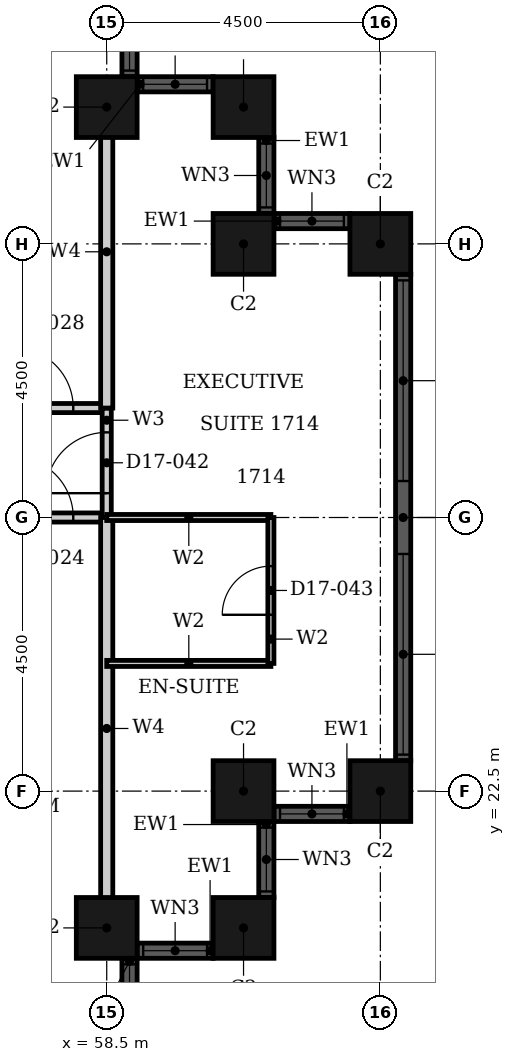
"""IFC4 building model, lengths in metres.
Left out: names, types, materials, properties, quantities, classifications, styles, units other than length and angle.
Written with IfcOpenShell. Run it as: python <this file> out.ifc"""

import sys

from ifc_helpers import new_model, si_unit, direction, frame, frame_2d, origin, origin_2d, place, context, subcontext, project, spatial, rectangle, hollow_rectangle, extrude, element, fill, save


model = new_model("IFC4")
c1 = context("Model", 3, precision=1e-05, world=origin(), true_north=direction((0.0, 1.0)))
c2 = subcontext(c1, "Body", "Model", "MODEL_VIEW")
j1 = project(units=[si_unit("LENGTHUNIT", "METRE"), si_unit("PLANEANGLEUNIT", "RADIAN")], contexts=[c1])
p1 = place(None, origin())
s1 = spatial("IfcSite", under=j1, at=p1, CompositionType="ELEMENT")
p2 = place(p1, origin())
s2 = spatial("IfcBuilding", under=s1, at=p2, CompositionType="ELEMENT")
p3 = place(p2, frame((0.0, 0.0, 74.4)))
s3 = spatial("IfcBuildingStorey", under=s2, at=p3, CompositionType="ELEMENT", Elevation=74.4)
for number, where, z_axis, x_axis in (
    (1, (58.5, 20.25, 0.0), (0.0, 0.0, 1.0), (1.0, 0.0, 0.0)),
    (2, (60.75, 20.25, 0.0), (0.0, 0.0, 1.0), (1.0, 0.0, 0.0)),
    (3, (60.75, 22.5, 0.0), (0.0, 0.0, 1.0), (1.0, 0.0, 0.0)),
    (4, (63.0, 22.5, 0.0), (0.0, 0.0, 1.0), (1.0, 0.0, 0.0)),
    (5, (63.0, 31.5, 0.0), (0.0, 0.0, 1.0), (1.0, 0.0, 0.0)),
    (6, (60.75, 31.5, 0.0), (0.0, 0.0, 1.0), (1.0, 0.0, 0.0)),
    (7, (60.75, 33.75, 0.0), (0.0, 0.0, 1.0), (1.0, 0.0, 0.0)),
    (8, (58.5, 33.75, 0.0), (0.0, 0.0, 1.0), (1.0, 0.0, 0.0)),
):
    element("IfcColumn", number, at=place(p3, frame(where, z_axis=z_axis, x_axis=x_axis)), inside=s3, PredefinedType="COLUMN", context=c2, shape_type="SweptSolid", body=[
        extrude(hollow_rectangle(XDim=1.0, YDim=1.0, WallThickness=0.032, at=origin_2d()), origin(), (0.0, 0.0, 1.0), 3.6),
    ])
p4 = place(p3, frame((58.875, 18.5, 0.0), z_axis=(0.0, 0.0, 1.0), x_axis=(0.0, 1.0, 0.0)))
e9 = element("IfcWall", 9, at=p4, inside=s3, PredefinedType="SOLIDWALL", context=c2, shape_type="SweptSolid", body=[
    extrude(rectangle(XDim=1.25, YDim=0.25, at=frame_2d((0.625, 0.0))), origin(), (0.0, 0.0, 1.0), 3.6),
])
p5 = place(p4, frame((0.1, 0.0, 0.9)))
e10 = element("IfcOpeningElement", 10, at=p5, cuts=e9, PredefinedType="OPENING", context=c2, shape_type="SweptSolid", body=[
    extrude(rectangle(XDim=1.05, YDim=2.08, at=frame_2d((0.525, 1.04))), frame((0.0, 0.135, 0.0), z_axis=(0.0, -1.0, 0.0), x_axis=(1.0, 0.0, 0.0)), (0.0, 0.0, 1.0), 0.27),
])
p6 = place(p3, frame((59.0, 19.875, 0.0), z_axis=(0.0, 0.0, 1.0), x_axis=(1.0, 0.0, 0.0)))
e11 = element("IfcWall", 11, at=p6, inside=s3, PredefinedType="SOLIDWALL", context=c2, shape_type="SweptSolid", body=[
    extrude(rectangle(XDim=1.25, YDim=0.25, at=frame_2d((0.625, 0.0))), origin(), (0.0, 0.0, 1.0), 3.6),
])
p7 = place(p6, frame((0.1, 0.0, 0.9)))
e12 = element("IfcOpeningElement", 12, at=p7, cuts=e11, PredefinedType="OPENING", context=c2, shape_type="SweptSolid", body=[
    extrude(rectangle(XDim=1.05, YDim=2.08, at=frame_2d((0.525, 1.04))), frame((0.0, 0.135, 0.0), z_axis=(0.0, -1.0, 0.0), x_axis=(1.0, 0.0, 0.0)), (0.0, 0.0, 1.0), 0.27),
])
p8 = place(p3, frame((61.125, 20.75, 0.0), z_axis=(0.0, 0.0, 1.0), x_axis=(0.0, 1.0, 0.0)))
e13 = element("IfcWall", 13, at=p8, inside=s3, PredefinedType="SOLIDWALL", context=c2, shape_type="SweptSolid", body=[
    extrude(rectangle(XDim=1.25, YDim=0.25, at=frame_2d((0.625, 0.0))), origin(), (0.0, 0.0, 1.0), 3.6),
])
p9 = place(p8, frame((0.1, 0.0, 0.9)))
e14 = element("IfcOpeningElement", 14, at=p9, cuts=e13, PredefinedType="OPENING", context=c2, shape_type="SweptSolid", body=[
    extrude(rectangle(XDim=1.05, YDim=2.08, at=frame_2d((0.525, 1.04))), frame((0.0, 0.135, 0.0), z_axis=(0.0, -1.0, 0.0), x_axis=(1.0, 0.0, 0.0)), (0.0, 0.0, 1.0), 0.27),
])
p10 = place(p3, frame((61.25, 22.125, 0.0), z_axis=(0.0, 0.0, 1.0), x_axis=(1.0, 0.0, 0.0)))
e15 = element("IfcWall", 15, at=p10, inside=s3, PredefinedType="SOLIDWALL", context=c2, shape_type="SweptSolid", body=[
    extrude(rectangle(XDim=1.25, YDim=0.25, at=frame_2d((0.625, 0.0))), origin(), (0.0, 0.0, 1.0), 3.6),
])
p11 = place(p10, frame((0.1, 0.0, 0.9)))
e16 = element("IfcOpeningElement", 16, at=p11, cuts=e15, PredefinedType="OPENING", context=c2, shape_type="SweptSolid", body=[
    extrude(rectangle(XDim=1.05, YDim=2.08, at=frame_2d((0.525, 1.04))), frame((0.0, 0.135, 0.0), z_axis=(0.0, -1.0, 0.0), x_axis=(1.0, 0.0, 0.0)), (0.0, 0.0, 1.0), 0.27),
])
p12 = place(p3, frame((63.375, 23.0, 0.0), z_axis=(0.0, 0.0, 1.0), x_axis=(0.0, 1.0, 0.0)))
e17 = element("IfcWall", 17, at=p12, inside=s3, PredefinedType="SOLIDWALL", context=c2, shape_type="SweptSolid", body=[
    extrude(rectangle(XDim=8.0, YDim=0.25, at=frame_2d((4.0, 0.0))), origin(), (0.0, 0.0, 1.0), 3.6),
])
p13 = place(p12, frame((0.1, 0.0, 0.9)))
e18 = element("IfcOpeningElement", 18, at=p13, cuts=e17, PredefinedType="OPENING", context=c2, shape_type="SweptSolid", body=[
    extrude(rectangle(XDim=3.3, YDim=2.08, at=frame_2d((1.65, 1.04))), frame((0.0, 0.135, 0.0), z_axis=(0.0, -1.0, 0.0), x_axis=(1.0, 0.0, 0.0)), (0.0, 0.0, 1.0), 0.27),
])
p14 = place(p12, frame((4.6, 0.0, 0.9)))
e19 = element("IfcOpeningElement", 19, at=p14, cuts=e17, PredefinedType="OPENING", context=c2, shape_type="SweptSolid", body=[
    extrude(rectangle(XDim=3.3, YDim=2.08, at=frame_2d((1.65, 1.04))), frame((0.0, 0.135, 0.0), z_axis=(0.0, -1.0, 0.0), x_axis=(1.0, 0.0, 0.0)), (0.0, 0.0, 1.0), 0.27),
])
p15 = place(p3, frame((62.5, 31.875, 0.0), z_axis=(0.0, 0.0, 1.0), x_axis=(-1.0, 0.0, 0.0)))
e20 = element("IfcWall", 20, at=p15, inside=s3, PredefinedType="SOLIDWALL", context=c2, shape_type="SweptSolid", body=[
    extrude(rectangle(XDim=1.25, YDim=0.25, at=frame_2d((0.625, 0.0))), origin(), (0.0, 0.0, 1.0), 3.6),
])
p16 = place(p15, frame((0.1, 0.0, 0.9)))
e21 = element("IfcOpeningElement", 21, at=p16, cuts=e20, PredefinedType="OPENING", context=c2, shape_type="SweptSolid", body=[
    extrude(rectangle(XDim=1.05, YDim=2.08, at=frame_2d((0.525, 1.04))), frame((0.0, 0.135, 0.0), z_axis=(0.0, -1.0, 0.0), x_axis=(1.0, 0.0, 0.0)), (0.0, 0.0, 1.0), 0.27),
])
p17 = place(p3, frame((61.125, 32.0, 0.0), z_axis=(0.0, 0.0, 1.0), x_axis=(0.0, 1.0, 0.0)))
e22 = element("IfcWall", 22, at=p17, inside=s3, PredefinedType="SOLIDWALL", context=c2, shape_type="SweptSolid", body=[
    extrude(rectangle(XDim=1.25, YDim=0.25, at=frame_2d((0.625, 0.0))), origin(), (0.0, 0.0, 1.0), 3.6),
])
p18 = place(p17, frame((0.1, 0.0, 0.9)))
e23 = element("IfcOpeningElement", 23, at=p18, cuts=e22, PredefinedType="OPENING", context=c2, shape_type="SweptSolid", body=[
    extrude(rectangle(XDim=1.05, YDim=2.08, at=frame_2d((0.525, 1.04))), frame((0.0, 0.135, 0.0), z_axis=(0.0, -1.0, 0.0), x_axis=(1.0, 0.0, 0.0)), (0.0, 0.0, 1.0), 0.27),
])
p19 = place(p3, frame((60.25, 34.125, 0.0), z_axis=(0.0, 0.0, 1.0), x_axis=(-1.0, 0.0, 0.0)))
e24 = element("IfcWall", 24, at=p19, inside=s3, PredefinedType="SOLIDWALL", context=c2, shape_type="SweptSolid", body=[
    extrude(rectangle(XDim=1.25, YDim=0.25, at=frame_2d((0.625, 0.0))), origin(), (0.0, 0.0, 1.0), 3.6),
])
p20 = place(p19, frame((0.1, 0.0, 0.9)))
e25 = element("IfcOpeningElement", 25, at=p20, cuts=e24, PredefinedType="OPENING", context=c2, shape_type="SweptSolid", body=[
    extrude(rectangle(XDim=1.05, YDim=2.08, at=frame_2d((0.525, 1.04))), frame((0.0, 0.135, 0.0), z_axis=(0.0, -1.0, 0.0), x_axis=(1.0, 0.0, 0.0)), (0.0, 0.0, 1.0), 0.27),
])
p21 = place(p3, frame((58.875, 34.25, 0.0), z_axis=(0.0, 0.0, 1.0), x_axis=(0.0, 1.0, 0.0)))
e26 = element("IfcWall", 26, at=p21, inside=s3, PredefinedType="SOLIDWALL", context=c2, shape_type="SweptSolid", body=[
    extrude(rectangle(XDim=1.25, YDim=0.25, at=frame_2d((0.625, 0.0))), origin(), (0.0, 0.0, 1.0), 3.6),
])
p22 = place(p21, frame((0.1, 0.0, 0.9)))
e27 = element("IfcOpeningElement", 27, at=p22, cuts=e26, PredefinedType="OPENING", context=c2, shape_type="SweptSolid", body=[
    extrude(rectangle(XDim=1.05, YDim=2.08, at=frame_2d((0.525, 1.04))), frame((0.0, 0.135, 0.0), z_axis=(0.0, -1.0, 0.0), x_axis=(1.0, 0.0, 0.0)), (0.0, 0.0, 1.0), 0.27),
])
p23 = place(p3, frame((46.8, 27.0, 0.0), z_axis=(0.0, 0.0, 1.0), x_axis=(1.0, 0.0, 0.0)))
e28 = element("IfcWall", 28, at=p23, inside=s3, PredefinedType="PARTITIONING", context=c2, shape_type="SweptSolid", body=[
    extrude(rectangle(XDim=11.7, YDim=0.15, at=frame_2d((5.85, 0.0))), origin(), (0.0, 0.0, 1.0), 2.58),
])
p24 = place(p23, frame((5.65, 0.0, 0.0)))
e29 = element("IfcOpeningElement", 29, at=p24, cuts=e28, PredefinedType="OPENING", context=c2, shape_type="SweptSolid", body=[
    extrude(rectangle(XDim=1.0, YDim=2.1, at=frame_2d((0.5, 1.05))), frame((0.0, 0.085, 0.0), z_axis=(0.0, -1.0, 0.0), x_axis=(1.0, 0.0, 0.0)), (0.0, 0.0, 1.0), 0.17),
])
p25 = place(p23, frame((10.15, 0.0, 0.0)))
e30 = element("IfcOpeningElement", 30, at=p25, cuts=e28, PredefinedType="OPENING", context=c2, shape_type="SweptSolid", body=[
    extrude(rectangle(XDim=1.0, YDim=2.1, at=frame_2d((0.5, 1.05))), frame((0.0, 0.085, 0.0), z_axis=(0.0, -1.0, 0.0), x_axis=(1.0, 0.0, 0.0)), (0.0, 0.0, 1.0), 0.17),
])
p26 = place(p3, frame((46.8, 28.8, 0.0), z_axis=(0.0, 0.0, 1.0), x_axis=(1.0, 0.0, 0.0)))
e31 = element("IfcWall", 31, at=p26, inside=s3, PredefinedType="PARTITIONING", context=c2, shape_type="SweptSolid", body=[
    extrude(rectangle(XDim=11.7, YDim=0.15, at=frame_2d((5.85, 0.0))), origin(), (0.0, 0.0, 1.0), 3.3),
])
p27 = place(p26, frame((5.65, 0.0, 0.0)))
e32 = element("IfcOpeningElement", 32, at=p27, cuts=e31, PredefinedType="OPENING", context=c2, shape_type="SweptSolid", body=[
    extrude(rectangle(XDim=1.0, YDim=2.1, at=frame_2d((0.5, 1.05))), frame((0.0, 0.085, 0.0), z_axis=(0.0, -1.0, 0.0), x_axis=(1.0, 0.0, 0.0)), (0.0, 0.0, 1.0), 0.17),
])
p28 = place(p26, frame((10.15, 0.0, 0.0)))
e33 = element("IfcOpeningElement", 33, at=p28, cuts=e31, PredefinedType="OPENING", context=c2, shape_type="SweptSolid", body=[
    extrude(rectangle(XDim=1.0, YDim=2.1, at=frame_2d((0.5, 1.05))), frame((0.0, 0.085, 0.0), z_axis=(0.0, -1.0, 0.0), x_axis=(1.0, 0.0, 0.0)), (0.0, 0.0, 1.0), 0.17),
])
p29 = place(p3, frame((58.5, 27.0, 0.0), z_axis=(0.0, 0.0, 1.0), x_axis=(0.0, 1.0, 0.0)))
e34 = element("IfcWall", 34, at=p29, inside=s3, PredefinedType="PARTITIONING", context=c2, shape_type="SweptSolid", body=[
    extrude(rectangle(XDim=1.8, YDim=0.15, at=frame_2d((0.9, 0.0))), origin(), (0.0, 0.0, 1.0), 3.3),
])
p30 = place(p29, frame((0.4, 0.0, 0.0)))
e35 = element("IfcOpeningElement", 35, at=p30, cuts=e34, PredefinedType="OPENING", context=c2, shape_type="SweptSolid", body=[
    extrude(rectangle(XDim=1.0, YDim=2.1, at=frame_2d((0.5, 1.05))), frame((0.0, 0.085, 0.0), z_axis=(0.0, -1.0, 0.0), x_axis=(1.0, 0.0, 0.0)), (0.0, 0.0, 1.0), 0.17),
])
p31 = place(p3, frame((58.5, 28.8, 0.0), z_axis=(0.0, 0.0, 1.0), x_axis=(0.0, 1.0, 0.0)))
e36 = element("IfcWall", 36, at=p31, inside=s3, PredefinedType="PARTITIONING", context=c2, shape_type="SweptSolid", body=[
    extrude(rectangle(XDim=5.14, YDim=0.2, at=frame_2d((2.57, 0.0))), origin(), (0.0, 0.0, 1.0), 3.3),
])
p32 = place(p3, frame((58.5, 20.06, 0.0), z_axis=(0.0, 0.0, 1.0), x_axis=(0.0, 1.0, 0.0)))
e37 = element("IfcWall", 37, at=p32, inside=s3, PredefinedType="PARTITIONING", context=c2, shape_type="SweptSolid", body=[
    extrude(rectangle(XDim=6.94, YDim=0.2, at=frame_2d((3.47, 0.0))), origin(), (0.0, 0.0, 1.0), 3.3),
])
p33 = place(p3, frame((58.5, 24.6, 0.0), z_axis=(0.0, 0.0, 1.0), x_axis=(1.0, 0.0, 0.0)))
e38 = element("IfcWall", 38, at=p33, inside=s3, PredefinedType="PARTITIONING", context=c2, shape_type="SweptSolid", body=[
    extrude(rectangle(XDim=2.7, YDim=0.1, at=frame_2d((1.35, 0.0))), origin(), (0.0, 0.0, 1.0), 3.3),
])
p34 = place(p3, frame((58.5, 27.0, 0.0), z_axis=(0.0, 0.0, 1.0), x_axis=(1.0, 0.0, 0.0)))
e39 = element("IfcWall", 39, at=p34, inside=s3, PredefinedType="PARTITIONING", context=c2, shape_type="SweptSolid", body=[
    extrude(rectangle(XDim=2.7, YDim=0.1, at=frame_2d((1.35, 0.0))), origin(), (0.0, 0.0, 1.0), 2.58),
])
p35 = place(p3, frame((61.2, 24.6, 0.0), z_axis=(0.0, 0.0, 1.0), x_axis=(0.0, 1.0, 0.0)))
e40 = element("IfcWall", 40, at=p35, inside=s3, PredefinedType="PARTITIONING", context=c2, shape_type="SweptSolid", body=[
    extrude(rectangle(XDim=2.4, YDim=0.1, at=frame_2d((1.2, 0.0))), origin(), (0.0, 0.0, 1.0), 3.3),
])
p36 = place(p35, frame((0.8, 0.0, 0.0)))
e41 = element("IfcOpeningElement", 41, at=p36, cuts=e40, PredefinedType="OPENING", context=c2, shape_type="SweptSolid", body=[
    extrude(rectangle(XDim=0.8, YDim=2.1, at=frame_2d((0.4, 1.05))), frame((0.0, 0.06, 0.0), z_axis=(0.0, -1.0, 0.0), x_axis=(1.0, 0.0, 0.0)), (0.0, 0.0, 1.0), 0.12),
])
p37 = place(p5, origin())
e42 = element("IfcWindow", 42, at=p37, inside=s3, PartitioningType="SINGLE_PANEL", PredefinedType="WINDOW", context=c2, shape_type="SweptSolid", body=[
    extrude(rectangle(XDim=1.05, YDim=2.08, at=frame_2d((0.525, 1.04))), frame((0.0, 0.03, 0.0), z_axis=(0.0, -1.0, 0.0), x_axis=(1.0, 0.0, 0.0)), (0.0, 0.0, 1.0), 0.06),
])
fill(e10, e42)
p38 = place(p7, origin())
e43 = element("IfcWindow", 43, at=p38, inside=s3, PartitioningType="SINGLE_PANEL", PredefinedType="WINDOW", context=c2, shape_type="SweptSolid", body=[
    extrude(rectangle(XDim=1.05, YDim=2.08, at=frame_2d((0.525, 1.04))), frame((0.0, 0.03, 0.0), z_axis=(0.0, -1.0, 0.0), x_axis=(1.0, 0.0, 0.0)), (0.0, 0.0, 1.0), 0.06),
])
fill(e12, e43)
p39 = place(p9, origin())
e44 = element("IfcWindow", 44, at=p39, inside=s3, PartitioningType="SINGLE_PANEL", PredefinedType="WINDOW", context=c2, shape_type="SweptSolid", body=[
    extrude(rectangle(XDim=1.05, YDim=2.08, at=frame_2d((0.525, 1.04))), frame((0.0, 0.03, 0.0), z_axis=(0.0, -1.0, 0.0), x_axis=(1.0, 0.0, 0.0)), (0.0, 0.0, 1.0), 0.06),
])
fill(e14, e44)
p40 = place(p11, origin())
e45 = element("IfcWindow", 45, at=p40, inside=s3, PartitioningType="SINGLE_PANEL", PredefinedType="WINDOW", context=c2, shape_type="SweptSolid", body=[
    extrude(rectangle(XDim=1.05, YDim=2.08, at=frame_2d((0.525, 1.04))), frame((0.0, 0.03, 0.0), z_axis=(0.0, -1.0, 0.0), x_axis=(1.0, 0.0, 0.0)), (0.0, 0.0, 1.0), 0.06),
])
fill(e16, e45)
p41 = place(p13, origin())
e46 = element("IfcWindow", 46, at=p41, inside=s3, PartitioningType="SINGLE_PANEL", PredefinedType="WINDOW", context=c2, shape_type="SweptSolid", body=[
    extrude(rectangle(XDim=3.3, YDim=2.08, at=frame_2d((1.65, 1.04))), frame((0.0, 0.03, 0.0), z_axis=(0.0, -1.0, 0.0), x_axis=(1.0, 0.0, 0.0)), (0.0, 0.0, 1.0), 0.06),
])
fill(e18, e46)
p42 = place(p14, origin())
e47 = element("IfcWindow", 47, at=p42, inside=s3, PartitioningType="SINGLE_PANEL", PredefinedType="WINDOW", context=c2, shape_type="SweptSolid", body=[
    extrude(rectangle(XDim=3.3, YDim=2.08, at=frame_2d((1.65, 1.04))), frame((0.0, 0.03, 0.0), z_axis=(0.0, -1.0, 0.0), x_axis=(1.0, 0.0, 0.0)), (0.0, 0.0, 1.0), 0.06),
])
fill(e19, e47)
p43 = place(p16, origin())
e48 = element("IfcWindow", 48, at=p43, inside=s3, PartitioningType="SINGLE_PANEL", PredefinedType="WINDOW", context=c2, shape_type="SweptSolid", body=[
    extrude(rectangle(XDim=1.05, YDim=2.08, at=frame_2d((0.525, 1.04))), frame((0.0, 0.03, 0.0), z_axis=(0.0, -1.0, 0.0), x_axis=(1.0, 0.0, 0.0)), (0.0, 0.0, 1.0), 0.06),
])
fill(e21, e48)
p44 = place(p18, origin())
e49 = element("IfcWindow", 49, at=p44, inside=s3, PartitioningType="SINGLE_PANEL", PredefinedType="WINDOW", context=c2, shape_type="SweptSolid", body=[
    extrude(rectangle(XDim=1.05, YDim=2.08, at=frame_2d((0.525, 1.04))), frame((0.0, 0.03, 0.0), z_axis=(0.0, -1.0, 0.0), x_axis=(1.0, 0.0, 0.0)), (0.0, 0.0, 1.0), 0.06),
])
fill(e23, e49)
p45 = place(p20, origin())
e50 = element("IfcWindow", 50, at=p45, inside=s3, PartitioningType="SINGLE_PANEL", PredefinedType="WINDOW", context=c2, shape_type="SweptSolid", body=[
    extrude(rectangle(XDim=1.05, YDim=2.08, at=frame_2d((0.525, 1.04))), frame((0.0, 0.03, 0.0), z_axis=(0.0, -1.0, 0.0), x_axis=(1.0, 0.0, 0.0)), (0.0, 0.0, 1.0), 0.06),
])
fill(e25, e50)
p46 = place(p22, origin())
e51 = element("IfcWindow", 51, at=p46, inside=s3, PartitioningType="SINGLE_PANEL", PredefinedType="WINDOW", context=c2, shape_type="SweptSolid", body=[
    extrude(rectangle(XDim=1.05, YDim=2.08, at=frame_2d((0.525, 1.04))), frame((0.0, 0.03, 0.0), z_axis=(0.0, -1.0, 0.0), x_axis=(1.0, 0.0, 0.0)), (0.0, 0.0, 1.0), 0.06),
])
fill(e27, e51)
p47 = place(p25, origin())
e52 = element("IfcDoor", 52, at=p47, inside=s3, OperationType="SINGLE_SWING_RIGHT", PredefinedType="DOOR", context=c2, shape_type="SweptSolid", body=[
    extrude(rectangle(XDim=1.0, YDim=2.1, at=frame_2d((0.5, 1.05))), frame((0.0, 0.025, 0.0), z_axis=(0.0, -1.0, 0.0), x_axis=(1.0, 0.0, 0.0)), (0.0, 0.0, 1.0), 0.05),
])
fill(e30, e52)
p48 = place(p28, origin())
e53 = element("IfcDoor", 53, at=p48, inside=s3, OperationType="SINGLE_SWING_RIGHT", PredefinedType="DOOR", context=c2, shape_type="SweptSolid", body=[
    extrude(rectangle(XDim=1.0, YDim=2.1, at=frame_2d((0.5, 1.05))), frame((0.0, 0.025, 0.0), z_axis=(0.0, -1.0, 0.0), x_axis=(1.0, 0.0, 0.0)), (0.0, 0.0, 1.0), 0.05),
])
fill(e33, e53)
p49 = place(p30, origin())
e54 = element("IfcDoor", 54, at=p49, inside=s3, OperationType="SINGLE_SWING_RIGHT", PredefinedType="DOOR", context=c2, shape_type="SweptSolid", body=[
    extrude(rectangle(XDim=1.0, YDim=2.1, at=frame_2d((0.5, 1.05))), frame((0.0, 0.025, 0.0), z_axis=(0.0, -1.0, 0.0), x_axis=(1.0, 0.0, 0.0)), (0.0, 0.0, 1.0), 0.05),
])
fill(e35, e54)
p50 = place(p36, origin())
e55 = element("IfcDoor", 55, at=p50, inside=s3, OperationType="SINGLE_SWING_RIGHT", PredefinedType="DOOR", context=c2, shape_type="SweptSolid", body=[
    extrude(rectangle(XDim=0.8, YDim=2.1, at=frame_2d((0.4, 1.05))), frame((0.0, 0.025, 0.0), z_axis=(0.0, -1.0, 0.0), x_axis=(1.0, 0.0, 0.0)), (0.0, 0.0, 1.0), 0.05),
])
fill(e41, e55)
save(model, sys.argv[1])
